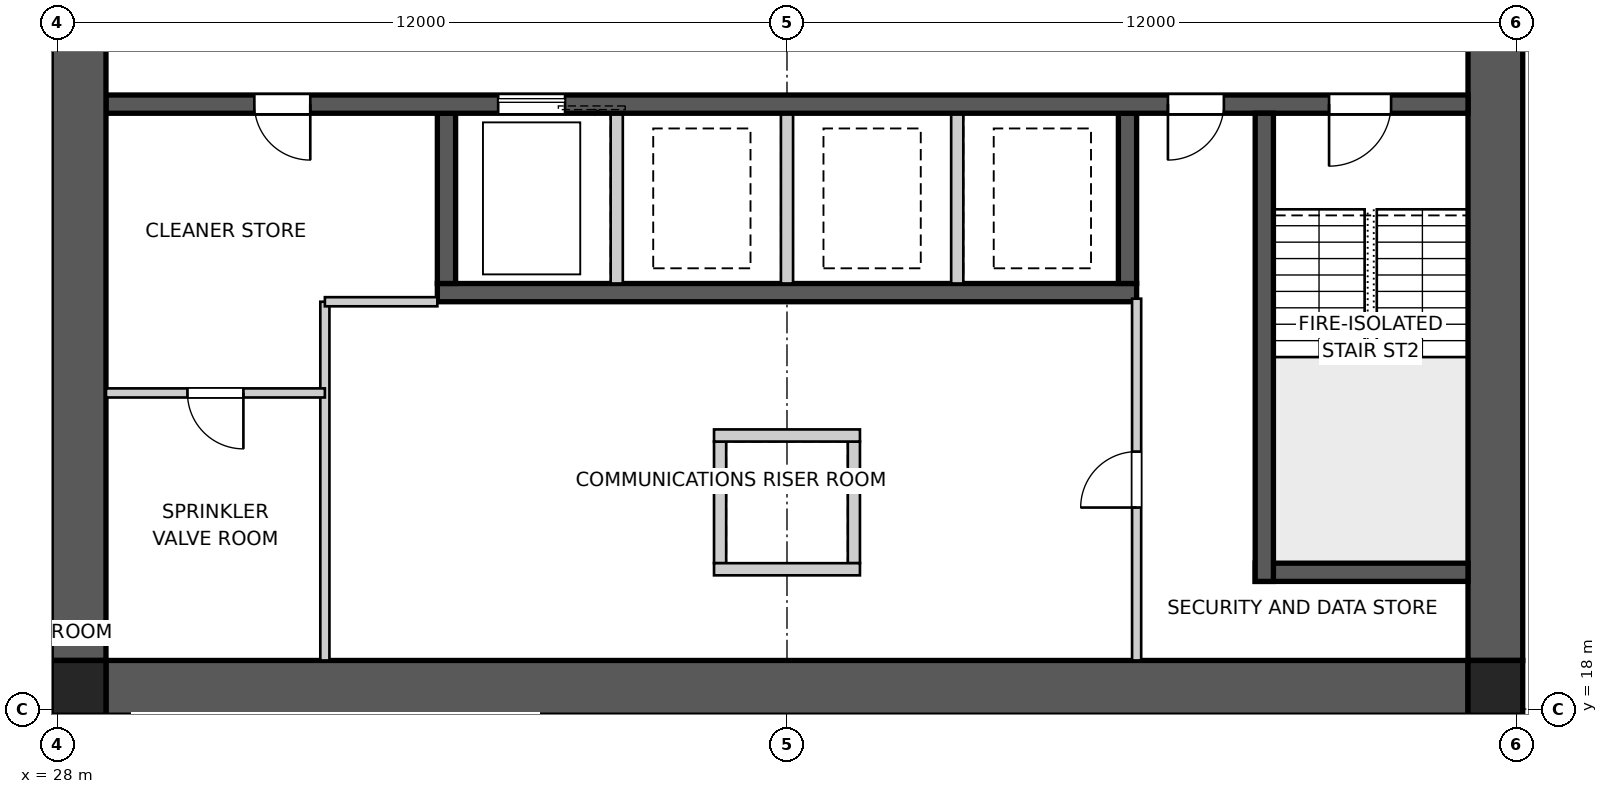
"""IFC4 building model, lengths in metres.
Left out: names, types, materials, properties, quantities, classifications, styles, units other than length and angle.
Written with IfcOpenShell. Run it as: python <this file> out.ifc"""

import sys

from ifc_helpers import new_model, si_unit, direction, frame, frame_2d, origin, origin_2d, place, context, subcontext, project, spatial, polyline, rectangle, outline, extrude, element, fill, save


model = new_model("IFC4")
c1 = context("Model", 3, precision=1e-05, world=origin(), true_north=direction((0.0, 1.0)))
c2 = subcontext(c1, "Body", "Model", "MODEL_VIEW")
j1 = project(units=[si_unit("LENGTHUNIT", "METRE"), si_unit("PLANEANGLEUNIT", "RADIAN")], contexts=[c1])
p1 = place(None, origin())
s1 = spatial("IfcSite", under=j1, at=p1, CompositionType="ELEMENT")
p2 = place(p1, origin())
s2 = spatial("IfcBuilding", under=s1, at=p2, CompositionType="ELEMENT")
p3 = place(p2, frame((0.0, 0.0, 15.0)))
s3 = spatial("IfcBuildingStorey", under=s2, at=p3, CompositionType="ELEMENT", Elevation=15.0)
p4 = place(p3, frame((51.2, 18.35, 0.0), z_axis=(0.0, 0.0, 1.0), x_axis=(-1.0, 0.0, 0.0)))
e1 = element("IfcWall", 1, at=p4, inside=s3, PredefinedType="SHEAR", context=c2, shape_type="SweptSolid", body=[
    extrude(outline(polyline([(0.0, -0.45), (22.4, -0.45), (22.4, -0.025), (22.85, -0.025), (22.85, 0.025), (22.4, 0.025), (22.4, 0.45), (0.0, 0.45), (0.0, 0.025), (-0.45, 0.025), (-0.45, -0.025), (0.0, -0.025), (0.0, -0.45)])), origin(), (0.0, 0.0, 1.0), 3.4),
])
p5 = place(p3, frame((51.65, 18.8, 0.0), z_axis=(0.0, 0.0, 1.0), x_axis=(0.0, 1.0, 0.0)))
e2 = element("IfcWall", 2, at=p5, inside=s3, PredefinedType="SHEAR", context=c2, shape_type="SweptSolid", body=[
    extrude(outline(polyline([(0.0, -0.45), (22.4, -0.45), (22.4, -0.025), (22.85, -0.025), (22.85, 0.025), (22.4, 0.025), (22.4, 0.45), (0.0, 0.45), (0.0, 0.025), (-0.45, 0.025), (-0.45, -0.025), (0.0, -0.025), (0.0, -0.45)])), origin(), (0.0, 0.0, 1.0), 3.4),
])
p6 = place(p5, frame((11.14, 0.0, 0.0)))
e3 = element("IfcOpeningElement", 3, at=p6, cuts=e2, PredefinedType="OPENING", context=c2, shape_type="SweptSolid", body=[
    extrude(rectangle(XDim=1.02, YDim=2.4, at=frame_2d((0.51, 1.2))), frame((0.0, 0.46, 0.0), z_axis=(0.0, -1.0, 0.0), x_axis=(1.0, 0.0, 0.0)), (0.0, 0.0, 1.0), 0.92),
])
p7 = place(p3, frame((28.35, 41.2, 0.0), z_axis=(0.0, 0.0, 1.0), x_axis=(0.0, -1.0, 0.0)))
e4 = element("IfcWall", 4, at=p7, inside=s3, PredefinedType="SHEAR", context=c2, shape_type="SweptSolid", body=[
    extrude(outline(polyline([(0.0, -0.45), (22.4, -0.45), (22.4, -0.025), (22.85, -0.025), (22.85, 0.025), (22.4, 0.025), (22.4, 0.45), (0.0, 0.45), (0.0, 0.025), (-0.45, 0.025), (-0.45, -0.025), (0.0, -0.025), (0.0, -0.45)])), origin(), (0.0, 0.0, 1.0), 3.4),
])
p8 = place(p7, frame((11.14, 0.0, 0.0)))
e5 = element("IfcOpeningElement", 5, at=p8, cuts=e4, PredefinedType="OPENING", context=c2, shape_type="SweptSolid", body=[
    extrude(rectangle(XDim=1.02, YDim=2.4, at=frame_2d((0.51, 1.2))), frame((0.0, 0.46, 0.0), z_axis=(0.0, -1.0, 0.0), x_axis=(1.0, 0.0, 0.0)), (0.0, 0.0, 1.0), 0.92),
])
p9 = place(p3, frame((51.2, 27.95, 0.0), z_axis=(0.0, 0.0, 1.0), x_axis=(-1.0, 0.0, 0.0)))
e6 = element("IfcWall", 6, at=p9, inside=s3, PredefinedType="SHEAR", context=c2, shape_type="SweptSolid", body=[
    extrude(rectangle(XDim=22.4, YDim=0.3, at=frame_2d((11.2, 0.0))), origin(), (0.0, 0.0, 1.0), 3.4),
])
p10 = place(p9, frame((19.04, 0.0, 0.0)))
e7 = element("IfcOpeningElement", 7, at=p10, cuts=e6, PredefinedType="OPENING", context=c2, shape_type="SweptSolid", body=[
    extrude(rectangle(XDim=0.92, YDim=2.1, at=frame_2d((0.46, 1.05))), frame((0.0, 0.16, 0.0), z_axis=(0.0, -1.0, 0.0), x_axis=(1.0, 0.0, 0.0)), (0.0, 0.0, 1.0), 0.32),
])
p11 = place(p9, frame((1.265, 0.0, 0.0)))
e8 = element("IfcOpeningElement", 8, at=p11, cuts=e6, PredefinedType="OPENING", context=c2, shape_type="SweptSolid", body=[
    extrude(rectangle(XDim=1.02, YDim=2.1, at=frame_2d((0.51, 1.05))), frame((0.0, 0.16, 0.0), z_axis=(0.0, -1.0, 0.0), x_axis=(1.0, 0.0, 0.0)), (0.0, 0.0, 1.0), 0.32),
])
p12 = place(p9, frame((4.015, 0.0, 0.0)))
e9 = element("IfcOpeningElement", 9, at=p12, cuts=e6, PredefinedType="OPENING", context=c2, shape_type="SweptSolid", body=[
    extrude(rectangle(XDim=0.92, YDim=2.1, at=frame_2d((0.46, 1.05))), frame((0.0, 0.16, 0.0), z_axis=(0.0, -1.0, 0.0), x_axis=(1.0, 0.0, 0.0)), (0.0, 0.0, 1.0), 0.32),
])
p13 = place(p9, frame((14.85, 0.0, 0.0)))
e10 = element("IfcOpeningElement", 10, at=p13, cuts=e6, PredefinedType="OPENING", context=c2, shape_type="SweptSolid", body=[
    extrude(rectangle(XDim=1.1, YDim=2.1, at=frame_2d((0.55, 1.05))), frame((0.0, 0.16, 0.0), z_axis=(0.0, -1.0, 0.0), x_axis=(1.0, 0.0, 0.0)), (0.0, 0.0, 1.0), 0.32),
])
p14 = place(p3, frame((45.75, 24.85, 0.0), z_axis=(0.0, 0.0, 1.0), x_axis=(-1.0, 0.0, 0.0)))
e11 = element("IfcWall", 11, at=p14, inside=s3, PredefinedType="SHEAR", context=c2, shape_type="SweptSolid", body=[
    extrude(rectangle(XDim=11.5, YDim=0.3, at=frame_2d((5.75, 0.0))), origin(), (0.0, 0.0, 1.0), 3.4),
])
p15 = place(p3, frame((45.6, 27.8, 0.0), z_axis=(0.0, 0.0, 1.0), x_axis=(0.0, -1.0, 0.0)))
e12 = element("IfcWall", 12, at=p15, inside=s3, PredefinedType="SHEAR", context=c2, shape_type="SweptSolid", body=[
    extrude(rectangle(XDim=2.8, YDim=0.3, at=frame_2d((1.4, 0.0))), origin(), (0.0, 0.0, 1.0), 3.4),
])
for number, where, z_axis, x_axis in (
    (13, (42.8, 27.8, 0.0), (0.0, 0.0, 1.0), (0.0, -1.0, 0.0)),
    (14, (40.0, 27.8, 0.0), (0.0, 0.0, 1.0), (0.0, -1.0, 0.0)),
    (15, (37.2, 27.8, 0.0), (0.0, 0.0, 1.0), (0.0, -1.0, 0.0)),
):
    element("IfcWall", number, at=place(p3, frame(where, z_axis=z_axis, x_axis=x_axis)), inside=s3, PredefinedType="SOLIDWALL", context=c2, shape_type="SweptSolid", body=[
        extrude(rectangle(XDim=2.8, YDim=0.2, at=frame_2d((1.4, 0.0))), origin(), (0.0, 0.0, 1.0), 3.4),
    ])
p16 = place(p3, frame((34.4, 27.8, 0.0), z_axis=(0.0, 0.0, 1.0), x_axis=(0.0, -1.0, 0.0)))
e16 = element("IfcWall", 16, at=p16, inside=s3, PredefinedType="SHEAR", context=c2, shape_type="SweptSolid", body=[
    extrude(rectangle(XDim=2.8, YDim=0.3, at=frame_2d((1.4, 0.0))), origin(), (0.0, 0.0, 1.0), 3.4),
])
p17 = place(p3, frame((47.85, 27.8, 0.0), z_axis=(0.0, 0.0, 1.0), x_axis=(0.0, -1.0, 0.0)))
e17 = element("IfcWall", 17, at=p17, inside=s3, PredefinedType="SHEAR", context=c2, shape_type="SweptSolid", body=[
    extrude(rectangle(XDim=7.7, YDim=0.3, at=frame_2d((3.85, 0.0))), origin(), (0.0, 0.0, 1.0), 3.4),
])
p18 = place(p3, frame((51.2, 20.25, 0.0), z_axis=(0.0, 0.0, 1.0), x_axis=(-1.0, 0.0, 0.0)))
e18 = element("IfcWall", 18, at=p18, inside=s3, PredefinedType="SHEAR", context=c2, shape_type="SweptSolid", body=[
    extrude(rectangle(XDim=3.5, YDim=0.3, at=frame_2d((1.75, 0.0))), origin(), (0.0, 0.0, 1.0), 3.4),
])
for number, where, z_axis, x_axis in (
    (19, (38.9, 22.4, 0.0), (0.0, 0.0, 1.0), (0.0, -1.0, 0.0)),
    (20, (41.1, 22.4, 0.0), (0.0, 0.0, 1.0), (0.0, -1.0, 0.0)),
):
    element("IfcWall", number, at=place(p3, frame(where, z_axis=z_axis, x_axis=x_axis)), inside=s3, PredefinedType="SOLIDWALL", context=c2, shape_type="SweptSolid", body=[
        extrude(rectangle(XDim=2.0, YDim=0.2, at=frame_2d((1.0, 0.0))), origin(), (0.0, 0.0, 1.0), 3.4),
    ])
for number, where, z_axis, x_axis in (
    (21, (38.8, 22.5, 0.0), (0.0, 0.0, 1.0), (1.0, 0.0, 0.0)),
    (22, (38.8, 20.3, 0.0), (0.0, 0.0, 1.0), (1.0, 0.0, 0.0)),
):
    element("IfcWall", number, at=place(p3, frame(where, z_axis=z_axis, x_axis=x_axis)), inside=s3, PredefinedType="SOLIDWALL", context=c2, shape_type="SweptSolid", body=[
        extrude(rectangle(XDim=2.4, YDim=0.2, at=frame_2d((1.2, 0.0))), origin(), (0.0, 0.0, 1.0), 3.4),
    ])
for number, where, z_axis, x_axis in (
    (23, (28.35, 18.35, 0.0), (0.0, 0.0, 1.0), (1.0, 0.0, 0.0)),
    (24, (51.65, 18.35, 0.0), (0.0, 0.0, 1.0), (1.0, 0.0, 0.0)),
):
    element("IfcColumn", number, at=place(p3, frame(where, z_axis=z_axis, x_axis=x_axis)), inside=s3, PredefinedType="COLUMN", context=c2, shape_type="SweptSolid", body=[
        extrude(rectangle(XDim=0.9, YDim=0.9, at=origin_2d()), origin(), (0.0, 0.0, 1.0), 3.4),
    ])
p19 = place(p3, frame((45.75, 18.8, 0.0), z_axis=(0.0, 0.0, 1.0), x_axis=(0.0, 1.0, 0.0)))
e25 = element("IfcWall", 25, at=p19, inside=s3, PredefinedType="SOLIDWALL", context=c2, shape_type="SweptSolid", body=[
    extrude(rectangle(XDim=5.95, YDim=0.15, at=frame_2d((2.975, 0.0))), origin(), (0.0, 0.0, 1.0), 3.25),
])
p20 = place(p19, frame((2.515, 0.0, 0.0)))
e26 = element("IfcOpeningElement", 26, at=p20, cuts=e25, PredefinedType="OPENING", context=c2, shape_type="SweptSolid", body=[
    extrude(rectangle(XDim=0.92, YDim=2.1, at=frame_2d((0.46, 1.05))), frame((0.0, 0.085, 0.0), z_axis=(0.0, -1.0, 0.0), x_axis=(1.0, 0.0, 0.0)), (0.0, 0.0, 1.0), 0.17),
])
p21 = place(p3, frame((32.4, 18.8, 0.0), z_axis=(0.0, 0.0, 1.0), x_axis=(0.0, 1.0, 0.0)))
e27 = element("IfcWall", 27, at=p21, inside=s3, PredefinedType="SOLIDWALL", context=c2, shape_type="SweptSolid", body=[
    extrude(rectangle(XDim=5.9, YDim=0.15, at=frame_2d((2.95, 0.0))), origin(), (0.0, 0.0, 1.0), 3.25),
])
p22 = place(p3, frame((32.4, 24.7, 0.0), z_axis=(0.0, 0.0, 1.0), x_axis=(1.0, 0.0, 0.0)))
e28 = element("IfcWall", 28, at=p22, inside=s3, PredefinedType="SOLIDWALL", context=c2, shape_type="SweptSolid", body=[
    extrude(rectangle(XDim=1.85, YDim=0.15, at=frame_2d((0.925, 0.0))), origin(), (0.0, 0.0, 1.0), 3.25),
])
p23 = place(p3, frame((32.4, 23.2, 0.0), z_axis=(0.0, 0.0, 1.0), x_axis=(-1.0, 0.0, 0.0)))
e29 = element("IfcWall", 29, at=p23, inside=s3, PredefinedType="SOLIDWALL", context=c2, shape_type="SweptSolid", body=[
    extrude(rectangle(XDim=3.6, YDim=0.15, at=frame_2d((1.8, 0.0))), origin(), (0.0, 0.0, 1.0), 3.25),
])
p24 = place(p23, frame((1.34, 0.0, 0.0)))
e30 = element("IfcOpeningElement", 30, at=p24, cuts=e29, PredefinedType="OPENING", context=c2, shape_type="SweptSolid", body=[
    extrude(rectangle(XDim=0.92, YDim=2.1, at=frame_2d((0.46, 1.05))), frame((0.0, 0.085, 0.0), z_axis=(0.0, -1.0, 0.0), x_axis=(1.0, 0.0, 0.0)), (0.0, 0.0, 1.0), 0.17),
])
p25 = place(p10, origin())
e31 = element("IfcDoor", 31, at=p25, inside=s3, OperationType="SINGLE_SWING_LEFT", PredefinedType="DOOR", context=c2, shape_type="SweptSolid", body=[
    extrude(rectangle(XDim=0.92, YDim=2.1, at=frame_2d((0.46, 1.05))), frame((0.0, 0.025, 0.0), z_axis=(0.0, -1.0, 0.0), x_axis=(1.0, 0.0, 0.0)), (0.0, 0.0, 1.0), 0.05),
])
fill(e7, e31)
p26 = place(p11, origin())
e32 = element("IfcDoor", 32, at=p26, inside=s3, OperationType="SINGLE_SWING_RIGHT", PredefinedType="DOOR", context=c2, shape_type="SweptSolid", body=[
    extrude(rectangle(XDim=1.02, YDim=2.1, at=frame_2d((0.51, 1.05))), frame((0.0, 0.025, 0.0), z_axis=(0.0, -1.0, 0.0), x_axis=(1.0, 0.0, 0.0)), (0.0, 0.0, 1.0), 0.05),
])
fill(e8, e32)
p27 = place(p12, origin())
e33 = element("IfcDoor", 33, at=p27, inside=s3, OperationType="SINGLE_SWING_RIGHT", PredefinedType="DOOR", context=c2, shape_type="SweptSolid", body=[
    extrude(rectangle(XDim=0.92, YDim=2.1, at=frame_2d((0.46, 1.05))), frame((0.0, 0.025, 0.0), z_axis=(0.0, -1.0, 0.0), x_axis=(1.0, 0.0, 0.0)), (0.0, 0.0, 1.0), 0.05),
])
fill(e9, e33)
p28 = place(p24, origin())
e34 = element("IfcDoor", 34, at=p28, inside=s3, OperationType="SINGLE_SWING_LEFT", PredefinedType="DOOR", context=c2, shape_type="SweptSolid", body=[
    extrude(rectangle(XDim=0.92, YDim=2.1, at=frame_2d((0.46, 1.05))), frame((0.0, 0.025, 0.0), z_axis=(0.0, -1.0, 0.0), x_axis=(1.0, 0.0, 0.0)), (0.0, 0.0, 1.0), 0.05),
])
fill(e30, e34)
p29 = place(p20, origin())
e35 = element("IfcDoor", 35, at=p29, inside=s3, OperationType="SINGLE_SWING_LEFT", PredefinedType="DOOR", context=c2, shape_type="SweptSolid", body=[
    extrude(rectangle(XDim=0.92, YDim=2.1, at=frame_2d((0.46, 1.05))), frame((0.0, 0.025, 0.0), z_axis=(0.0, -1.0, 0.0), x_axis=(1.0, 0.0, 0.0)), (0.0, 0.0, 1.0), 0.05),
])
fill(e26, e35)
p30 = place(p13, origin())
e36 = element("IfcDoor", 36, at=p30, inside=s3, OperationType="SLIDING_TO_LEFT", PredefinedType="DOOR", context=c2, shape_type="SweptSolid", body=[
    extrude(rectangle(XDim=1.1, YDim=2.1, at=frame_2d((0.55, 1.05))), frame((0.0, 0.025, 0.0), z_axis=(0.0, -1.0, 0.0), x_axis=(1.0, 0.0, 0.0)), (0.0, 0.0, 1.0), 0.05),
])
fill(e10, e36)
save(model, sys.argv[1])
